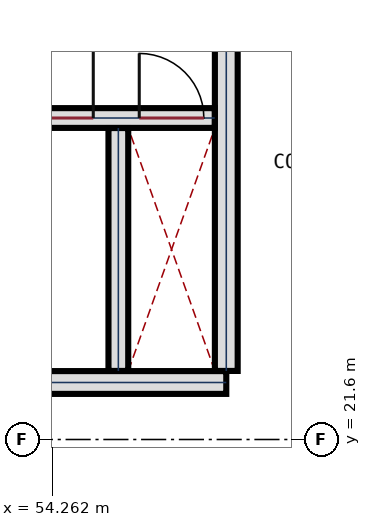
"""IFC4 building model, lengths in metres.
Left out: names, types, materials, properties, quantities, classifications, styles, units other than length and angle.
Written with IfcOpenShell. Run it as: python <this file> out.ifc"""

import sys

from ifc_helpers import new_model, si_unit, direction, frame, frame_2d, origin, place, context, subcontext, project, spatial, rectangle, extrude, element, fill, save


model = new_model("IFC4")
c1 = context("Model", 3, precision=1e-05, world=origin(), true_north=direction((0.0, 1.0)))
c2 = subcontext(c1, "Body", "Model", "MODEL_VIEW")
j1 = project(units=[si_unit("LENGTHUNIT", "METRE"), si_unit("PLANEANGLEUNIT", "RADIAN")], contexts=[c1])
p1 = place(None, origin())
s1 = spatial("IfcSite", under=j1, at=p1, CompositionType="ELEMENT")
p2 = place(p1, origin())
s2 = spatial("IfcBuilding", under=s1, at=p2, CompositionType="ELEMENT")
p3 = place(p2, frame((0.0, 0.0, 18.9)))
s3 = spatial("IfcBuildingStorey", under=s2, at=p3, CompositionType="ELEMENT", Elevation=18.9)
p4 = place(p3, frame((56.55, 22.35, 0.0), z_axis=(0.0, 0.0, 1.0), x_axis=(-1.0, 0.0, 0.0)))
e1 = element("IfcWall", 1, at=p4, inside=s3, PredefinedType="SHEAR", context=c2, shape_type="SweptSolid", body=[
    extrude(rectangle(XDim=9.5, YDim=0.3, at=frame_2d((4.75, 0.0))), origin(), (0.0, 0.0, 1.0), 4.5),
])
p5 = place(p3, frame((56.55, 30.298, 0.0), z_axis=(0.0, 0.0, 1.0), x_axis=(0.0, -1.0, 0.0)))
e2 = element("IfcWall", 2, at=p5, inside=s3, PredefinedType="SHEAR", context=c2, shape_type="SweptSolid", body=[
    extrude(rectangle(XDim=7.796, YDim=0.3, at=frame_2d((3.898, 0.0))), origin(), (0.0, 0.0, 1.0), 4.5),
])
p6 = place(p5, frame((1.398, 0.0, 0.0)))
e3 = element("IfcOpeningElement", 3, at=p6, cuts=e2, PredefinedType="OPENING", context=c2, shape_type="SweptSolid", body=[
    extrude(rectangle(XDim=1.5, YDim=2.25, at=frame_2d((0.75, 1.125))), frame((0.0, 0.16, 0.0), z_axis=(0.0, -1.0, 0.0), x_axis=(1.0, 0.0, 0.0)), (0.0, 0.0, 1.0), 0.32),
])
p7 = place(p3, frame((47.202, 25.83, 0.0), z_axis=(0.0, 0.0, 1.0), x_axis=(1.0, 0.0, 0.0)))
e4 = element("IfcWall", 4, at=p7, inside=s3, PredefinedType="SHEAR", context=c2, shape_type="SweptSolid", body=[
    extrude(rectangle(XDim=9.196, YDim=0.26, at=frame_2d((4.598, 0.0))), origin(), (0.0, 0.0, 1.0), 4.5),
])
p8 = place(p7, frame((6.398, 0.0, 0.0)))
e5 = element("IfcOpeningElement", 5, at=p8, cuts=e4, PredefinedType="OPENING", context=c2, shape_type="SweptSolid", body=[
    extrude(rectangle(XDim=1.2, YDim=2.2, at=frame_2d((0.6, 1.1))), frame((0.0, 0.14, 0.0), z_axis=(0.0, -1.0, 0.0), x_axis=(1.0, 0.0, 0.0)), (0.0, 0.0, 1.0), 0.28),
])
p9 = place(p7, frame((8.203, 0.0, 0.0)))
e6 = element("IfcOpeningElement", 6, at=p9, cuts=e4, PredefinedType="OPENING", context=c2, shape_type="SweptSolid", body=[
    extrude(rectangle(XDim=0.85, YDim=2.05, at=frame_2d((0.425, 1.025))), frame((0.0, 0.14, 0.0), z_axis=(0.0, -1.0, 0.0), x_axis=(1.0, 0.0, 0.0)), (0.0, 0.0, 1.0), 0.28),
])
p10 = place(p3, frame((55.13, 22.502, 0.0), z_axis=(0.0, 0.0, 1.0), x_axis=(0.0, 1.0, 0.0)))
e7 = element("IfcWall", 7, at=p10, inside=s3, PredefinedType="SHEAR", context=c2, shape_type="SweptSolid", body=[
    extrude(rectangle(XDim=3.196, YDim=0.26, at=frame_2d((1.598, 0.0))), origin(), (0.0, 0.0, 1.0), 4.5),
])
p11 = place(p8, origin())
e8 = element("IfcDoor", 8, at=p11, inside=s3, OperationType="SINGLE_SWING_RIGHT", PredefinedType="DOOR", context=c2, shape_type="SweptSolid", body=[
    extrude(rectangle(XDim=1.2, YDim=2.2, at=frame_2d((0.6, 1.1))), frame((0.0, 0.032, 0.0), z_axis=(0.0, -1.0, 0.0), x_axis=(1.0, 0.0, 0.0)), (0.0, 0.0, 1.0), 0.065),
])
fill(e5, e8)
p12 = place(p9, origin())
e9 = element("IfcDoor", 9, at=p12, inside=s3, OperationType="SINGLE_SWING_LEFT", PredefinedType="DOOR", context=c2, shape_type="SweptSolid", body=[
    extrude(rectangle(XDim=0.85, YDim=2.05, at=frame_2d((0.425, 1.025))), frame((0.0, 0.032, 0.0), z_axis=(0.0, -1.0, 0.0), x_axis=(1.0, 0.0, 0.0)), (0.0, 0.0, 1.0), 0.065),
])
fill(e6, e9)
save(model, sys.argv[1])
